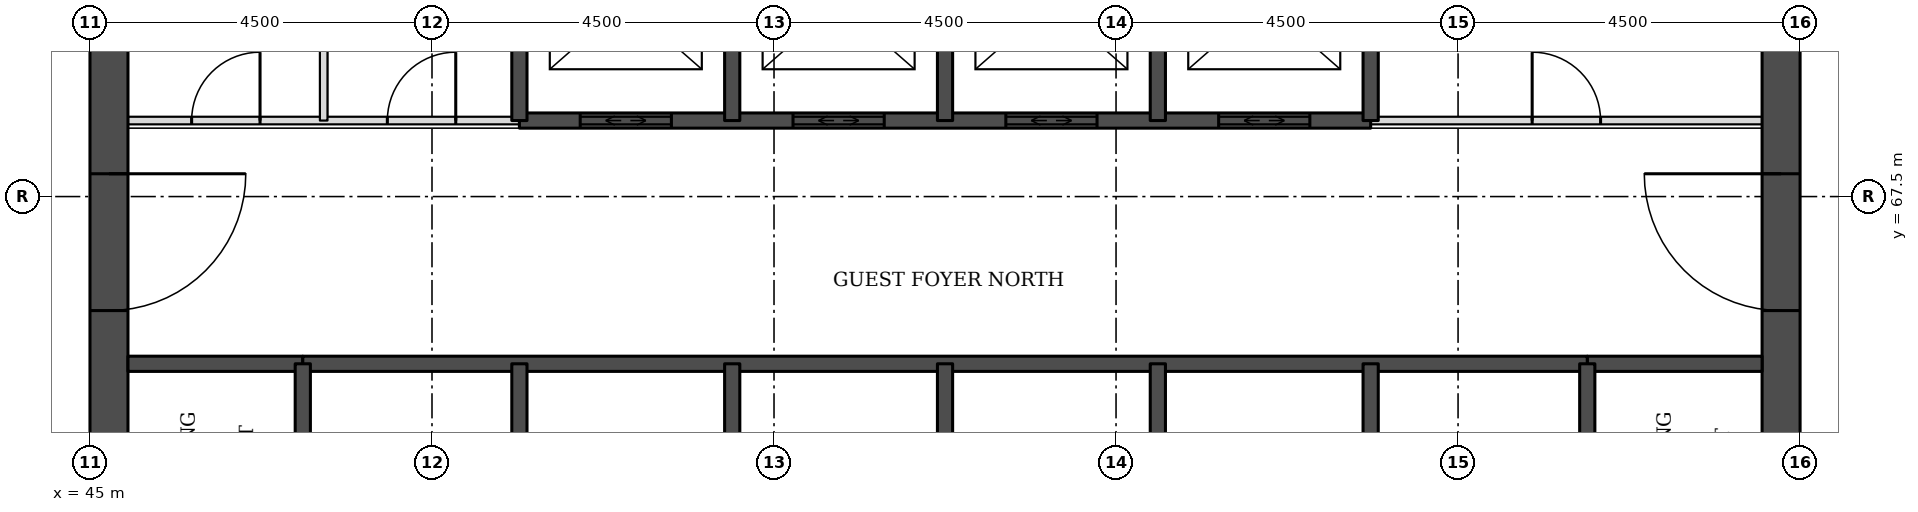
"""IFC4 building model, lengths in metres.
Left out: names, types, materials, properties, quantities, classifications, styles, units other than length and angle.
Written with IfcOpenShell. Run it as: python <this file> out.ifc"""

import sys

from ifc_helpers import new_model, si_unit, direction, frame, frame_2d, origin, place, context, subcontext, project, spatial, rectangle, extrude, element, fill, save


model = new_model("IFC4")
c1 = context("Model", 3, precision=1e-05, world=origin(), true_north=direction((0.0, 1.0)))
c2 = subcontext(c1, "Body", "Model", "MODEL_VIEW")
j1 = project(units=[si_unit("LENGTHUNIT", "METRE"), si_unit("PLANEANGLEUNIT", "RADIAN")], contexts=[c1])
p1 = place(None, origin())
s1 = spatial("IfcSite", under=j1, at=p1, CompositionType="ELEMENT")
p2 = place(p1, origin())
s2 = spatial("IfcBuilding", under=s1, at=p2, CompositionType="ELEMENT")
p3 = place(p2, frame((0.0, 0.0, 56.1)))
s3 = spatial("IfcBuildingStorey", under=s2, at=p3, CompositionType="ELEMENT", Elevation=56.1)
p4 = place(p3, frame((45.25, 49.5, 0.0), z_axis=(0.0, 0.0, 1.0), x_axis=(0.0, 1.0, 0.0)))
e1 = element("IfcWall", 1, at=p4, inside=s3, PredefinedType="SHEAR", context=c2, shape_type="SweptSolid", body=[
    extrude(rectangle(XDim=22.5, YDim=0.5, at=frame_2d((11.25, 0.0))), origin(), (0.0, 0.0, 1.0), 3.3),
])
p5 = place(p4, frame((4.2, 0.0, 0.0)))
e2 = element("IfcOpeningElement", 2, at=p5, cuts=e1, PredefinedType="OPENING", context=c2, shape_type="SweptSolid", body=[
    extrude(rectangle(XDim=1.8, YDim=2.1, at=frame_2d((0.9, 1.05))), frame((0.0, 0.26, 0.0), z_axis=(0.0, -1.0, 0.0), x_axis=(1.0, 0.0, 0.0)), (0.0, 0.0, 1.0), 0.52),
])
p6 = place(p4, frame((6.9, 0.0, 0.0)))
e3 = element("IfcOpeningElement", 3, at=p6, cuts=e1, PredefinedType="OPENING", context=c2, shape_type="SweptSolid", body=[
    extrude(rectangle(XDim=1.1, YDim=2.1, at=frame_2d((0.55, 1.05))), frame((0.0, 0.26, 0.0), z_axis=(0.0, -1.0, 0.0), x_axis=(1.0, 0.0, 0.0)), (0.0, 0.0, 1.0), 0.52),
])
p7 = place(p4, frame((13.6, 0.0, 0.0)))
e4 = element("IfcOpeningElement", 4, at=p7, cuts=e1, PredefinedType="OPENING", context=c2, shape_type="SweptSolid", body=[
    extrude(rectangle(XDim=1.1, YDim=2.1, at=frame_2d((0.55, 1.05))), frame((0.0, 0.26, 0.0), z_axis=(0.0, -1.0, 0.0), x_axis=(1.0, 0.0, 0.0)), (0.0, 0.0, 1.0), 0.52),
])
p8 = place(p4, frame((16.5, 0.0, 0.0)))
e5 = element("IfcOpeningElement", 5, at=p8, cuts=e1, PredefinedType="OPENING", context=c2, shape_type="SweptSolid", body=[
    extrude(rectangle(XDim=1.8, YDim=2.1, at=frame_2d((0.9, 1.05))), frame((0.0, 0.26, 0.0), z_axis=(0.0, -1.0, 0.0), x_axis=(1.0, 0.0, 0.0)), (0.0, 0.0, 1.0), 0.52),
])
p9 = place(p3, frame((67.25, 49.5, 0.0), z_axis=(0.0, 0.0, 1.0), x_axis=(0.0, 1.0, 0.0)))
e6 = element("IfcWall", 6, at=p9, inside=s3, PredefinedType="SHEAR", context=c2, shape_type="SweptSolid", body=[
    extrude(rectangle(XDim=22.5, YDim=0.5, at=frame_2d((11.25, 0.0))), origin(), (0.0, 0.0, 1.0), 3.3),
])
p10 = place(p9, frame((4.2, 0.0, 0.0)))
e7 = element("IfcOpeningElement", 7, at=p10, cuts=e6, PredefinedType="OPENING", context=c2, shape_type="SweptSolid", body=[
    extrude(rectangle(XDim=1.8, YDim=2.1, at=frame_2d((0.9, 1.05))), frame((0.0, 0.26, 0.0), z_axis=(0.0, -1.0, 0.0), x_axis=(1.0, 0.0, 0.0)), (0.0, 0.0, 1.0), 0.52),
])
p11 = place(p9, frame((6.9, 0.0, 0.0)))
e8 = element("IfcOpeningElement", 8, at=p11, cuts=e6, PredefinedType="OPENING", context=c2, shape_type="SweptSolid", body=[
    extrude(rectangle(XDim=1.1, YDim=2.1, at=frame_2d((0.55, 1.05))), frame((0.0, 0.26, 0.0), z_axis=(0.0, -1.0, 0.0), x_axis=(1.0, 0.0, 0.0)), (0.0, 0.0, 1.0), 0.52),
])
p12 = place(p9, frame((13.6, 0.0, 0.0)))
e9 = element("IfcOpeningElement", 9, at=p12, cuts=e6, PredefinedType="OPENING", context=c2, shape_type="SweptSolid", body=[
    extrude(rectangle(XDim=1.1, YDim=2.1, at=frame_2d((0.55, 1.05))), frame((0.0, 0.26, 0.0), z_axis=(0.0, -1.0, 0.0), x_axis=(1.0, 0.0, 0.0)), (0.0, 0.0, 1.0), 0.52),
])
p13 = place(p9, frame((16.5, 0.0, 0.0)))
e10 = element("IfcOpeningElement", 10, at=p13, cuts=e6, PredefinedType="OPENING", context=c2, shape_type="SweptSolid", body=[
    extrude(rectangle(XDim=1.8, YDim=2.1, at=frame_2d((0.9, 1.05))), frame((0.0, 0.26, 0.0), z_axis=(0.0, -1.0, 0.0), x_axis=(1.0, 0.0, 0.0)), (0.0, 0.0, 1.0), 0.52),
])
for number, where, z_axis, x_axis in (
    (11, (45.5, 65.3, 0.0), (0.0, 0.0, 1.0), (1.0, 0.0, 0.0)),
    (12, (64.7, 65.3, 0.0), (0.0, 0.0, 1.0), (1.0, 0.0, 0.0)),
):
    element("IfcWall", number, at=place(p3, frame(where, z_axis=z_axis, x_axis=x_axis)), inside=s3, PredefinedType="SOLIDWALL", context=c2, shape_type="SweptSolid", body=[
        extrude(rectangle(XDim=2.3, YDim=0.2, at=frame_2d((1.15, 0.0))), origin(), (0.0, 0.0, 1.0), 3.08),
    ])
p14 = place(p3, frame((47.8, 65.3, 0.0), z_axis=(0.0, 0.0, 1.0), x_axis=(1.0, 0.0, 0.0)))
e13 = element("IfcWall", 13, at=p14, inside=s3, PredefinedType="SOLIDWALL", context=c2, shape_type="SweptSolid", body=[
    extrude(rectangle(XDim=16.9, YDim=0.2, at=frame_2d((8.45, 0.0))), origin(), (0.0, 0.0, 1.0), 3.08),
])
p15 = place(p3, frame((45.5, 68.5, 0.0), z_axis=(0.0, 0.0, 1.0), x_axis=(1.0, 0.0, 0.0)))
e14 = element("IfcWall", 14, at=p15, inside=s3, PredefinedType="PARTITIONING", context=c2, shape_type="SweptSolid", body=[
    extrude(rectangle(XDim=5.15, YDim=0.1, at=frame_2d((2.575, 0.0))), origin(), (0.0, 0.0, 1.0), 3.08),
])
p16 = place(p15, frame((0.837, 0.0, 0.0)))
e15 = element("IfcOpeningElement", 15, at=p16, cuts=e14, PredefinedType="OPENING", context=c2, shape_type="SweptSolid", body=[
    extrude(rectangle(XDim=0.9, YDim=2.1, at=frame_2d((0.45, 1.05))), frame((0.0, 0.06, 0.0), z_axis=(0.0, -1.0, 0.0), x_axis=(1.0, 0.0, 0.0)), (0.0, 0.0, 1.0), 0.12),
])
p17 = place(p15, frame((3.413, 0.0, 0.0)))
e16 = element("IfcOpeningElement", 16, at=p17, cuts=e14, PredefinedType="OPENING", context=c2, shape_type="SweptSolid", body=[
    extrude(rectangle(XDim=0.9, YDim=2.1, at=frame_2d((0.45, 1.05))), frame((0.0, 0.06, 0.0), z_axis=(0.0, -1.0, 0.0), x_axis=(1.0, 0.0, 0.0)), (0.0, 0.0, 1.0), 0.12),
])
p18 = place(p3, frame((61.85, 68.5, 0.0), z_axis=(0.0, 0.0, 1.0), x_axis=(1.0, 0.0, 0.0)))
e17 = element("IfcWall", 17, at=p18, inside=s3, PredefinedType="PARTITIONING", context=c2, shape_type="SweptSolid", body=[
    extrude(rectangle(XDim=5.15, YDim=0.1, at=frame_2d((2.575, 0.0))), origin(), (0.0, 0.0, 1.0), 3.08),
])
p19 = place(p18, frame((2.125, 0.0, 0.0)))
e18 = element("IfcOpeningElement", 18, at=p19, cuts=e17, PredefinedType="OPENING", context=c2, shape_type="SweptSolid", body=[
    extrude(rectangle(XDim=0.9, YDim=2.1, at=frame_2d((0.45, 1.05))), frame((0.0, 0.06, 0.0), z_axis=(0.0, -1.0, 0.0), x_axis=(1.0, 0.0, 0.0)), (0.0, 0.0, 1.0), 0.12),
])
p20 = place(p3, frame((50.65, 68.5, 0.0), z_axis=(0.0, 0.0, 1.0), x_axis=(1.0, 0.0, 0.0)))
e19 = element("IfcWall", 19, at=p20, inside=s3, PredefinedType="SOLIDWALL", context=c2, shape_type="SweptSolid", body=[
    extrude(rectangle(XDim=11.2, YDim=0.2, at=frame_2d((5.6, 0.0))), origin(), (0.0, 0.0, 1.0), 3.08),
])
p21 = place(p20, frame((0.8, 0.0, 0.0)))
e20 = element("IfcOpeningElement", 20, at=p21, cuts=e19, PredefinedType="OPENING", context=c2, shape_type="SweptSolid", body=[
    extrude(rectangle(XDim=1.2, YDim=2.1, at=frame_2d((0.6, 1.05))), frame((0.0, 0.11, 0.0), z_axis=(0.0, -1.0, 0.0), x_axis=(1.0, 0.0, 0.0)), (0.0, 0.0, 1.0), 0.22),
])
p22 = place(p20, frame((3.6, 0.0, 0.0)))
e21 = element("IfcOpeningElement", 21, at=p22, cuts=e19, PredefinedType="OPENING", context=c2, shape_type="SweptSolid", body=[
    extrude(rectangle(XDim=1.2, YDim=2.1, at=frame_2d((0.6, 1.05))), frame((0.0, 0.11, 0.0), z_axis=(0.0, -1.0, 0.0), x_axis=(1.0, 0.0, 0.0)), (0.0, 0.0, 1.0), 0.22),
])
p23 = place(p20, frame((6.4, 0.0, 0.0)))
e22 = element("IfcOpeningElement", 22, at=p23, cuts=e19, PredefinedType="OPENING", context=c2, shape_type="SweptSolid", body=[
    extrude(rectangle(XDim=1.2, YDim=2.1, at=frame_2d((0.6, 1.05))), frame((0.0, 0.11, 0.0), z_axis=(0.0, -1.0, 0.0), x_axis=(1.0, 0.0, 0.0)), (0.0, 0.0, 1.0), 0.22),
])
p24 = place(p20, frame((9.2, 0.0, 0.0)))
e23 = element("IfcOpeningElement", 23, at=p24, cuts=e19, PredefinedType="OPENING", context=c2, shape_type="SweptSolid", body=[
    extrude(rectangle(XDim=1.2, YDim=2.1, at=frame_2d((0.6, 1.05))), frame((0.0, 0.11, 0.0), z_axis=(0.0, -1.0, 0.0), x_axis=(1.0, 0.0, 0.0)), (0.0, 0.0, 1.0), 0.22),
])
p25 = place(p3, frame((47.8, 62.0, 0.0), z_axis=(0.0, 0.0, 1.0), x_axis=(0.0, 1.0, 0.0)))
e24 = element("IfcWall", 24, at=p25, inside=s3, PredefinedType="SOLIDWALL", context=c2, shape_type="SweptSolid", body=[
    extrude(rectangle(XDim=3.3, YDim=0.2, at=frame_2d((1.65, 0.0))), origin(), (0.0, 0.0, 1.0), 3.08),
])
p26 = place(p25, frame((1.1, 0.0, 0.0)))
e25 = element("IfcOpeningElement", 25, at=p26, cuts=e24, PredefinedType="OPENING", context=c2, shape_type="SweptSolid", body=[
    extrude(rectangle(XDim=1.1, YDim=2.1, at=frame_2d((0.55, 1.05))), frame((0.0, 0.11, 0.0), z_axis=(0.0, -1.0, 0.0), x_axis=(1.0, 0.0, 0.0)), (0.0, 0.0, 1.0), 0.22),
])
p27 = place(p3, frame((48.075, 68.5, 0.0), z_axis=(0.0, 0.0, 1.0), x_axis=(0.0, 1.0, 0.0)))
e26 = element("IfcWall", 26, at=p27, inside=s3, PredefinedType="PARTITIONING", context=c2, shape_type="SweptSolid", body=[
    extrude(rectangle(XDim=3.0, YDim=0.1, at=frame_2d((1.5, 0.0))), origin(), (0.0, 0.0, 1.0), 3.08),
])
p28 = place(p3, frame((50.65, 62.0, 0.0), z_axis=(0.0, 0.0, 1.0), x_axis=(0.0, 1.0, 0.0)))
e27 = element("IfcWall", 27, at=p28, inside=s3, PredefinedType="SOLIDWALL", context=c2, shape_type="SweptSolid", body=[
    extrude(rectangle(XDim=3.3, YDim=0.2, at=frame_2d((1.65, 0.0))), origin(), (0.0, 0.0, 1.0), 3.08),
])
p29 = place(p3, frame((50.65, 68.5, 0.0), z_axis=(0.0, 0.0, 1.0), x_axis=(0.0, 1.0, 0.0)))
e28 = element("IfcWall", 28, at=p29, inside=s3, PredefinedType="SOLIDWALL", context=c2, shape_type="SweptSolid", body=[
    extrude(rectangle(XDim=3.0, YDim=0.2, at=frame_2d((1.5, 0.0))), origin(), (0.0, 0.0, 1.0), 3.08),
])
p30 = place(p3, frame((53.45, 62.5, 0.0), z_axis=(0.0, 0.0, 1.0), x_axis=(0.0, 1.0, 0.0)))
e29 = element("IfcWall", 29, at=p30, inside=s3, PredefinedType="SOLIDWALL", context=c2, shape_type="SweptSolid", body=[
    extrude(rectangle(XDim=2.8, YDim=0.2, at=frame_2d((1.4, 0.0))), origin(), (0.0, 0.0, 1.0), 3.08),
])
p31 = place(p3, frame((53.45, 68.5, 0.0), z_axis=(0.0, 0.0, 1.0), x_axis=(0.0, 1.0, 0.0)))
e30 = element("IfcWall", 30, at=p31, inside=s3, PredefinedType="SOLIDWALL", context=c2, shape_type="SweptSolid", body=[
    extrude(rectangle(XDim=3.0, YDim=0.2, at=frame_2d((1.5, 0.0))), origin(), (0.0, 0.0, 1.0), 3.08),
])
p32 = place(p3, frame((56.25, 62.5, 0.0), z_axis=(0.0, 0.0, 1.0), x_axis=(0.0, 1.0, 0.0)))
e31 = element("IfcWall", 31, at=p32, inside=s3, PredefinedType="SOLIDWALL", context=c2, shape_type="SweptSolid", body=[
    extrude(rectangle(XDim=2.8, YDim=0.2, at=frame_2d((1.4, 0.0))), origin(), (0.0, 0.0, 1.0), 3.08),
])
p33 = place(p3, frame((56.25, 68.5, 0.0), z_axis=(0.0, 0.0, 1.0), x_axis=(0.0, 1.0, 0.0)))
e32 = element("IfcWall", 32, at=p33, inside=s3, PredefinedType="SOLIDWALL", context=c2, shape_type="SweptSolid", body=[
    extrude(rectangle(XDim=3.0, YDim=0.2, at=frame_2d((1.5, 0.0))), origin(), (0.0, 0.0, 1.0), 3.08),
])
p34 = place(p3, frame((59.05, 62.5, 0.0), z_axis=(0.0, 0.0, 1.0), x_axis=(0.0, 1.0, 0.0)))
e33 = element("IfcWall", 33, at=p34, inside=s3, PredefinedType="SOLIDWALL", context=c2, shape_type="SweptSolid", body=[
    extrude(rectangle(XDim=2.8, YDim=0.2, at=frame_2d((1.4, 0.0))), origin(), (0.0, 0.0, 1.0), 3.08),
])
p35 = place(p3, frame((59.05, 68.5, 0.0), z_axis=(0.0, 0.0, 1.0), x_axis=(0.0, 1.0, 0.0)))
e34 = element("IfcWall", 34, at=p35, inside=s3, PredefinedType="SOLIDWALL", context=c2, shape_type="SweptSolid", body=[
    extrude(rectangle(XDim=3.0, YDim=0.2, at=frame_2d((1.5, 0.0))), origin(), (0.0, 0.0, 1.0), 3.08),
])
p36 = place(p3, frame((61.85, 62.0, 0.0), z_axis=(0.0, 0.0, 1.0), x_axis=(0.0, 1.0, 0.0)))
e35 = element("IfcWall", 35, at=p36, inside=s3, PredefinedType="SOLIDWALL", context=c2, shape_type="SweptSolid", body=[
    extrude(rectangle(XDim=3.3, YDim=0.2, at=frame_2d((1.65, 0.0))), origin(), (0.0, 0.0, 1.0), 3.08),
])
p37 = place(p3, frame((61.85, 68.5, 0.0), z_axis=(0.0, 0.0, 1.0), x_axis=(0.0, 1.0, 0.0)))
e36 = element("IfcWall", 36, at=p37, inside=s3, PredefinedType="SOLIDWALL", context=c2, shape_type="SweptSolid", body=[
    extrude(rectangle(XDim=3.0, YDim=0.2, at=frame_2d((1.5, 0.0))), origin(), (0.0, 0.0, 1.0), 3.08),
])
p38 = place(p3, frame((64.7, 62.0, 0.0), z_axis=(0.0, 0.0, 1.0), x_axis=(0.0, 1.0, 0.0)))
e37 = element("IfcWall", 37, at=p38, inside=s3, PredefinedType="SOLIDWALL", context=c2, shape_type="SweptSolid", body=[
    extrude(rectangle(XDim=3.3, YDim=0.2, at=frame_2d((1.65, 0.0))), origin(), (0.0, 0.0, 1.0), 3.08),
])
p39 = place(p38, frame((1.1, 0.0, 0.0)))
e38 = element("IfcOpeningElement", 38, at=p39, cuts=e37, PredefinedType="OPENING", context=c2, shape_type="SweptSolid", body=[
    extrude(rectangle(XDim=1.1, YDim=2.1, at=frame_2d((0.55, 1.05))), frame((0.0, 0.11, 0.0), z_axis=(0.0, -1.0, 0.0), x_axis=(1.0, 0.0, 0.0)), (0.0, 0.0, 1.0), 0.22),
])
p40 = place(p21, origin())
e39 = element("IfcDoor", 39, at=p40, inside=s3, OperationType="DOUBLE_DOOR_SLIDING", PredefinedType="DOOR", context=c2, shape_type="SweptSolid", body=[
    extrude(rectangle(XDim=1.2, YDim=2.1, at=frame_2d((0.6, 1.05))), frame((0.0, 0.025, 0.0), z_axis=(0.0, -1.0, 0.0), x_axis=(1.0, 0.0, 0.0)), (0.0, 0.0, 1.0), 0.05),
])
fill(e20, e39)
p41 = place(p22, origin())
e40 = element("IfcDoor", 40, at=p41, inside=s3, OperationType="DOUBLE_DOOR_SLIDING", PredefinedType="DOOR", context=c2, shape_type="SweptSolid", body=[
    extrude(rectangle(XDim=1.2, YDim=2.1, at=frame_2d((0.6, 1.05))), frame((0.0, 0.025, 0.0), z_axis=(0.0, -1.0, 0.0), x_axis=(1.0, 0.0, 0.0)), (0.0, 0.0, 1.0), 0.05),
])
fill(e21, e40)
p42 = place(p23, origin())
e41 = element("IfcDoor", 41, at=p42, inside=s3, OperationType="DOUBLE_DOOR_SLIDING", PredefinedType="DOOR", context=c2, shape_type="SweptSolid", body=[
    extrude(rectangle(XDim=1.2, YDim=2.1, at=frame_2d((0.6, 1.05))), frame((0.0, 0.025, 0.0), z_axis=(0.0, -1.0, 0.0), x_axis=(1.0, 0.0, 0.0)), (0.0, 0.0, 1.0), 0.05),
])
fill(e22, e41)
p43 = place(p24, origin())
e42 = element("IfcDoor", 42, at=p43, inside=s3, OperationType="DOUBLE_DOOR_SLIDING", PredefinedType="DOOR", context=c2, shape_type="SweptSolid", body=[
    extrude(rectangle(XDim=1.2, YDim=2.1, at=frame_2d((0.6, 1.05))), frame((0.0, 0.025, 0.0), z_axis=(0.0, -1.0, 0.0), x_axis=(1.0, 0.0, 0.0)), (0.0, 0.0, 1.0), 0.05),
])
fill(e23, e42)
p44 = place(p8, frame((1.8, 0.0, 0.0), z_axis=(0.0, 0.0, 1.0), x_axis=(-1.0, 0.0, 0.0)))
e43 = element("IfcDoor", 43, at=p44, inside=s3, OperationType="SINGLE_SWING_LEFT", PredefinedType="DOOR", context=c2, shape_type="SweptSolid", body=[
    extrude(rectangle(XDim=1.8, YDim=2.1, at=frame_2d((0.9, 1.05))), frame((0.0, 0.025, 0.0), z_axis=(0.0, -1.0, 0.0), x_axis=(1.0, 0.0, 0.0)), (0.0, 0.0, 1.0), 0.05),
])
fill(e5, e43)
p45 = place(p13, origin())
e44 = element("IfcDoor", 44, at=p45, inside=s3, OperationType="SINGLE_SWING_RIGHT", PredefinedType="DOOR", context=c2, shape_type="SweptSolid", body=[
    extrude(rectangle(XDim=1.8, YDim=2.1, at=frame_2d((0.9, 1.05))), frame((0.0, 0.025, 0.0), z_axis=(0.0, -1.0, 0.0), x_axis=(1.0, 0.0, 0.0)), (0.0, 0.0, 1.0), 0.05),
])
fill(e10, e44)
p46 = place(p19, origin())
e45 = element("IfcDoor", 45, at=p46, inside=s3, OperationType="SINGLE_SWING_LEFT", PredefinedType="DOOR", context=c2, shape_type="SweptSolid", body=[
    extrude(rectangle(XDim=0.9, YDim=2.1, at=frame_2d((0.45, 1.05))), frame((0.0, 0.025, 0.0), z_axis=(0.0, -1.0, 0.0), x_axis=(1.0, 0.0, 0.0)), (0.0, 0.0, 1.0), 0.05),
])
fill(e18, e45)
p47 = place(p16, origin())
e46 = element("IfcDoor", 46, at=p47, inside=s3, OperationType="SINGLE_SWING_RIGHT", PredefinedType="DOOR", context=c2, shape_type="SweptSolid", body=[
    extrude(rectangle(XDim=0.9, YDim=2.1, at=frame_2d((0.45, 1.05))), frame((0.0, 0.025, 0.0), z_axis=(0.0, -1.0, 0.0), x_axis=(1.0, 0.0, 0.0)), (0.0, 0.0, 1.0), 0.05),
])
fill(e15, e46)
p48 = place(p17, origin())
e47 = element("IfcDoor", 47, at=p48, inside=s3, OperationType="SINGLE_SWING_RIGHT", PredefinedType="DOOR", context=c2, shape_type="SweptSolid", body=[
    extrude(rectangle(XDim=0.9, YDim=2.1, at=frame_2d((0.45, 1.05))), frame((0.0, 0.025, 0.0), z_axis=(0.0, -1.0, 0.0), x_axis=(1.0, 0.0, 0.0)), (0.0, 0.0, 1.0), 0.05),
])
fill(e16, e47)
save(model, sys.argv[1])
